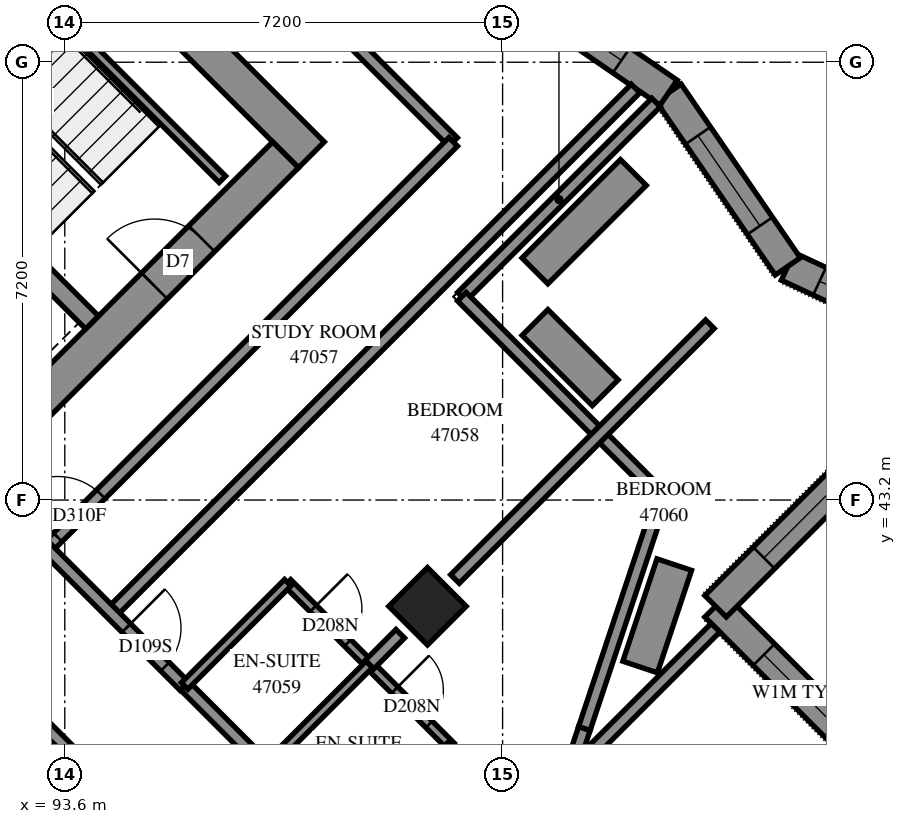
"""IFC4 building model, lengths in metres.
Left out: names, types, materials, properties, quantities, classifications, styles, units other than length and angle.
Written with IfcOpenShell. Run it as: python <this file> out.ifc"""

import sys

from ifc_helpers import new_model, si_unit, direction, frame, frame_2d, origin, origin_2d, place, context, subcontext, project, spatial, polyline, rectangle, outline, extrude, element, fill, save


model = new_model("IFC4")
c1 = context("Model", 3, precision=1e-05, world=origin(), true_north=direction((0.0, 1.0)))
c2 = subcontext(c1, "Body", "Model", "MODEL_VIEW")
j1 = project(units=[si_unit("LENGTHUNIT", "METRE"), si_unit("PLANEANGLEUNIT", "RADIAN")], contexts=[c1])
p1 = place(None, origin())
s1 = spatial("IfcSite", under=j1, at=p1, CompositionType="ELEMENT")
p2 = place(p1, origin())
s2 = spatial("IfcBuilding", under=s1, at=p2, CompositionType="ELEMENT")
p3 = place(p2, frame((0.0, 0.0, 172.8)))
s3 = spatial("IfcBuildingStorey", under=s2, at=p3, CompositionType="ELEMENT", Elevation=172.8)
p4 = place(p3, frame((99.565, 41.453, 0.0), z_axis=(0.0, 0.0, 1.0), x_axis=(0.7071067812, -0.7071067812, 0.0)))
e1 = element("IfcColumn", 1, at=p4, inside=s3, PredefinedType="COLUMN", context=c2, shape_type="SweptSolid", body=[
    extrude(rectangle(XDim=0.9, YDim=0.9, at=origin_2d()), origin(), (0.0, 0.0, 1.0), 3.1),
])
p5 = place(p3, frame((86.625, 59.908, -0.3), z_axis=(0.0, 0.0, 1.0), x_axis=(0.7071067812, -0.7071067812, 0.0)))
e2 = element("IfcWall", 2, at=p5, inside=s3, PredefinedType="SHEAR", context=c2, shape_type="SweptSolid", body=[
    extrude(rectangle(XDim=15.6, YDim=0.6, at=frame_2d((7.8, 0.0))), origin(), (0.0, 0.0, 1.0), 2.7),
])
p6 = place(p5, frame((10.6, 0.0, 0.3)))
e3 = element("IfcOpeningElement", 3, at=p6, cuts=e2, PredefinedType="OPENING", context=c2, shape_type="SweptSolid", body=[
    extrude(rectangle(XDim=0.8, YDim=2.1, at=frame_2d((0.4, 1.05))), frame((0.0, 0.31, 0.0), z_axis=(0.0, -1.0, 0.0), x_axis=(1.0, 0.0, 0.0)), (0.0, 0.0, 1.0), 0.62),
])
p7 = place(p3, frame((87.049, 38.695, -0.3), z_axis=(0.0, 0.0, 1.0), x_axis=(0.7071067812, 0.7071067812, 0.0)))
e4 = element("IfcWall", 4, at=p7, inside=s3, PredefinedType="SHEAR", context=c2, shape_type="SweptSolid", body=[
    extrude(rectangle(XDim=14.4, YDim=0.6, at=frame_2d((7.2, 0.0))), origin(), (0.0, 0.0, 1.0), 2.7),
])
p8 = place(p7, frame((4.55, 0.0, 0.3)))
e5 = element("IfcOpeningElement", 5, at=p8, cuts=e4, PredefinedType="OPENING", context=c2, shape_type="SweptSolid", body=[
    extrude(rectangle(XDim=1.1, YDim=2.1, at=frame_2d((0.55, 1.05))), frame((0.0, 0.31, 0.0), z_axis=(0.0, -1.0, 0.0), x_axis=(1.0, 0.0, 0.0)), (0.0, 0.0, 1.0), 0.62),
])
p9 = place(p7, frame((11.35, 0.0, 0.3)))
e6 = element("IfcOpeningElement", 6, at=p9, cuts=e4, PredefinedType="OPENING", context=c2, shape_type="SweptSolid", body=[
    extrude(rectangle(XDim=1.1, YDim=2.1, at=frame_2d((0.55, 1.05))), frame((0.0, 0.31, 0.0), z_axis=(0.0, -1.0, 0.0), x_axis=(1.0, 0.0, 0.0)), (0.0, 0.0, 1.0), 0.62),
])
p10 = place(p3, frame((88.958, 51.211, 0.0), z_axis=(0.0, 0.0, 1.0), x_axis=(0.7070998367, -0.7071137256, 0.0)))
e7 = element("IfcWall", 7, at=p10, inside=s3, PredefinedType="SOLIDWALL", context=c2, shape_type="SweptSolid", body=[
    extrude(rectangle(XDim=7.2, YDim=0.3, at=frame_2d((3.6, 0.0))), origin(), (0.0, 0.0, 1.0), 3.1),
])
p11 = place(p3, frame((107.761, 37.994, 0.0), z_axis=(0.0, 0.0, 1.0), x_axis=(-0.7071272252, 0.7070863366, 0.0)))
e8 = element("IfcWall", 8, at=p11, inside=s3, PredefinedType="SOLIDWALL", context=c2, shape_type="SweptSolid", body=[
    extrude(outline(polyline([(-0.159, -0.25), (4.641, -0.25), (5.141, 0.25), (0.159, 0.25), (-0.159, -0.25)])), origin(), (0.0, 0.0, 1.0), 3.1),
])
p12 = place(p11, frame((1.966, 0.0, 0.7)))
e9 = element("IfcOpeningElement", 9, at=p12, cuts=e8, PredefinedType="OPENING", context=c2, shape_type="SweptSolid", body=[
    extrude(rectangle(XDim=1.8, YDim=1.8, at=frame_2d((0.9, 0.9))), frame((0.0, 0.26, 0.0), z_axis=(0.0, -1.0, 0.0), x_axis=(1.0, 0.0, 0.0)), (0.0, 0.0, 1.0), 0.52),
])
p13 = place(p3, frame((104.302, 41.453, 0.0), z_axis=(0.0, 0.0, 1.0), x_axis=(0.7071152225, 0.7070983398, 0.0)))
e10 = element("IfcWall", 10, at=p13, inside=s3, PredefinedType="SOLIDWALL", context=c2, shape_type="SweptSolid", body=[
    extrude(outline(polyline([(0.25, -0.25), (6.28, -0.25), (5.566, 0.25), (-0.25, 0.25), (0.25, -0.25)])), origin(), (0.0, 0.0, 1.0), 3.1),
])
p14 = place(p13, frame((1.125, 0.0, 0.7)))
e11 = element("IfcOpeningElement", 11, at=p14, cuts=e10, PredefinedType="OPENING", context=c2, shape_type="SweptSolid", body=[
    extrude(rectangle(XDim=1.8, YDim=1.8, at=frame_2d((0.9, 0.9))), frame((0.0, 0.26, 0.0), z_axis=(0.0, -1.0, 0.0), x_axis=(1.0, 0.0, 0.0)), (0.0, 0.0, 1.0), 0.52),
])
p15 = place(p3, frame((108.491, 45.641, 0.0), z_axis=(0.0, 0.0, 1.0), x_axis=(-0.9061206526, 0.4230193411, 0.0)))
e12 = element("IfcWall", 12, at=p15, inside=s3, PredefinedType="SOLIDWALL", context=c2, shape_type="SweptSolid", body=[
    extrude(outline(polyline([(-0.357, -0.25), (3.244, -0.25), (3.38, 0.25), (0.357, 0.25), (-0.357, -0.25)])), origin(), (0.0, 0.0, 1.0), 3.1),
])
p16 = place(p15, frame((0.934, 0.0, 0.7)))
e13 = element("IfcOpeningElement", 13, at=p16, cuts=e12, PredefinedType="OPENING", context=c2, shape_type="SweptSolid", body=[
    extrude(rectangle(XDim=1.8, YDim=1.8, at=frame_2d((0.9, 0.9))), frame((0.0, 0.26, 0.0), z_axis=(0.0, -1.0, 0.0), x_axis=(1.0, 0.0, 0.0)), (0.0, 0.0, 1.0), 0.52),
])
p17 = place(p3, frame((105.489, 47.042, 0.0), z_axis=(0.0, 0.0, 1.0), x_axis=(-0.5657493712, 0.8245772547, 0.0)))
e14 = element("IfcWall", 14, at=p17, inside=s3, PredefinedType="SOLIDWALL", context=c2, shape_type="SweptSolid", body=[
    extrude(outline(polyline([(0.068, -0.25), (3.511, -0.25), (3.417, 0.25), (-0.068, 0.25), (0.068, -0.25)])), origin(), (0.0, 0.0, 1.0), 3.1),
])
p18 = place(p17, frame((0.809, 0.0, 0.7)))
e15 = element("IfcOpeningElement", 15, at=p18, cuts=e14, PredefinedType="OPENING", context=c2, shape_type="SweptSolid", body=[
    extrude(rectangle(XDim=1.8, YDim=1.8, at=frame_2d((0.9, 0.9))), frame((0.0, 0.26, 0.0), z_axis=(0.0, -1.0, 0.0), x_axis=(1.0, 0.0, 0.0)), (0.0, 0.0, 1.0), 0.52),
])
p19 = place(p3, frame((103.53, 49.899, 0.0), z_axis=(0.0, 0.0, 1.0), x_axis=(-0.8245704852, 0.5657592376, 0.0)))
e16 = element("IfcWall", 16, at=p19, inside=s3, PredefinedType="SOLIDWALL", context=c2, shape_type="SweptSolid", body=[
    extrude(outline(polyline([(-0.046, -0.25), (3.396, -0.25), (3.489, 0.25), (0.046, 0.25), (-0.046, -0.25)])), origin(), (0.0, 0.0, 1.0), 3.1),
])
p20 = place(p19, frame((0.941, 0.0, 0.7)))
e17 = element("IfcOpeningElement", 17, at=p20, cuts=e16, PredefinedType="OPENING", context=c2, shape_type="SweptSolid", body=[
    extrude(rectangle(XDim=1.8, YDim=2.1, at=frame_2d((0.9, 1.05))), frame((0.0, 0.26, 0.0), z_axis=(0.0, -1.0, 0.0), x_axis=(1.0, 0.0, 0.0)), (0.0, 0.0, 1.0), 0.52),
])
p21 = place(p3, frame((103.323, 49.737, 0.0), z_axis=(0.0, 0.0, 1.0), x_axis=(-0.707117854, -0.7070957082, 0.0)))
e18 = element("IfcWall", 18, at=p21, inside=s3, PredefinedType="PARAPET", context=c2, shape_type="SweptSolid", body=[
    extrude(outline(polyline([(0.0, -0.1), (4.615, -0.1), (4.415, 0.1), (0.0, 0.1), (0.0, -0.1)])), origin(), (0.0, 0.0, 1.0), 0.25),
])
p22 = place(p3, frame((100.13, 46.544, 0.0), z_axis=(0.0, 0.0, 1.0), x_axis=(0.7070852627, -0.707128299, 0.0)))
e19 = element("IfcWall", 19, at=p22, inside=s3, PredefinedType="PARAPET", context=c2, shape_type="SweptSolid", body=[
    extrude(outline(polyline([(-0.1, -0.1), (4.585, -0.1), (4.709, 0.1), (0.1, 0.1), (-0.1, -0.1)])), origin(), (0.0, 0.0, 1.0), 0.25),
])
p23 = place(p3, frame((103.416, 43.258, 0.0), z_axis=(0.0, 0.0, 1.0), x_axis=(-0.3160011426, -0.9487588091, 0.0)))
e20 = element("IfcWall", 20, at=p23, inside=s3, PredefinedType="PARAPET", context=c2, shape_type="SweptSolid", body=[
    extrude(outline(polyline([(0.062, -0.1), (0.397, -0.1), (0.397, 0.1), (-0.062, 0.1), (0.062, -0.1)])), origin(), (0.0, 0.0, 1.0), 0.25),
])
p24 = place(p3, frame((103.291, 42.881, 0.0), z_axis=(0.0, 0.0, 1.0), x_axis=(-0.3162443117, -0.9486777827, 0.0)))
e21 = element("IfcWall", 21, at=p24, inside=s3, PredefinedType="PARAPET", context=c2, shape_type="SweptSolid", body=[
    extrude(outline(polyline([(0.0, -0.1), (3.626, -0.1), (3.626, 0.1), (0.0, 0.1), (0.0, -0.1)])), origin(), (0.0, 0.0, 1.0), 0.25),
])
p25 = place(p3, frame((102.144, 39.441, 0.0), z_axis=(0.0, 0.0, 1.0), x_axis=(-0.3161671582, -0.9487034985, 0.0)))
e22 = element("IfcWall", 22, at=p25, inside=s3, PredefinedType="PARAPET", context=c2, shape_type="SweptSolid", body=[
    extrude(outline(polyline([(0.0, -0.1), (0.99, -0.1), (0.99, 0.1), (0.0, 0.1), (0.0, -0.1)])), origin(), (0.0, 0.0, 1.0), 0.25),
])
p26 = place(p3, frame((101.332, 46.12, 0.0), z_axis=(0.0, 0.0, 1.0), x_axis=(0.7070761738, -0.7071373872, 0.0)))
e23 = element("IfcWall", 23, at=p26, inside=s3, PredefinedType="SOLIDWALL", context=c2, shape_type="SweptSolid", body=[
    extrude(rectangle(XDim=1.634, YDim=0.6, at=frame_2d((0.817, 0.0))), origin(), (0.0, 0.0, 1.0), 0.65),
])
p27 = place(p3, frame((103.623, 42.138, 0.0), z_axis=(0.0, 0.0, 1.0), x_axis=(-0.3162446684, -0.9486776638, 0.0)))
e24 = element("IfcWall", 24, at=p27, inside=s3, PredefinedType="SOLIDWALL", context=c2, shape_type="SweptSolid", body=[
    extrude(rectangle(XDim=1.775, YDim=0.6, at=frame_2d((0.887, 0.0))), origin(), (0.0, 0.0, 1.0), 0.65),
])
p28 = place(p3, frame((91.313, 53.354, 0.0), z_axis=(0.0, 0.0, 1.0), x_axis=(0.7071140275, -0.7070995348, 0.0)))
e25 = element("IfcWall", 25, at=p28, inside=s3, PredefinedType="PARTITIONING", context=c2, shape_type="SweptSolid", body=[
    extrude(rectangle(XDim=6.9, YDim=0.15, at=frame_2d((3.45, 0.0))), origin(), (0.0, 0.0, 1.0), 3.1),
])
p29 = place(p3, frame((94.366, 41.348, 0.0), z_axis=(0.0, 0.0, 1.0), x_axis=(0.7071108825, 0.7071026798, 0.0)))
e26 = element("IfcWall", 26, at=p29, inside=s3, PredefinedType="PARTITIONING", context=c2, shape_type="SweptSolid", body=[
    extrude(rectangle(XDim=12.191, YDim=0.2, at=frame_2d((6.096, 0.0))), origin(), (0.0, 0.0, 1.0), 3.1),
])
p30 = place(p3, frame((91.967, 40.785, 0.0), z_axis=(0.0, 0.0, 1.0), x_axis=(0.7071067812, -0.7071067812, 0.0)))
e27 = element("IfcWall", 27, at=p30, inside=s3, PredefinedType="PARTITIONING", context=c2, shape_type="SweptSolid", body=[
    extrude(rectangle(XDim=12.1, YDim=0.2, at=frame_2d((6.05, 0.0))), origin(), (0.0, 0.0, 1.0), 3.1),
])
p31 = place(p30, frame((3.448, 0.0, 0.0)))
e28 = element("IfcOpeningElement", 28, at=p31, cuts=e27, PredefinedType="OPENING", context=c2, shape_type="SweptSolid", body=[
    extrude(rectangle(XDim=0.9, YDim=2.1, at=frame_2d((0.45, 1.05))), frame((0.0, 0.11, 0.0), z_axis=(0.0, -1.0, 0.0), x_axis=(1.0, 0.0, 0.0)), (0.0, 0.0, 1.0), 0.22),
])
p32 = place(p30, frame((8.457, 0.0, 0.0)))
e29 = element("IfcOpeningElement", 29, at=p32, cuts=e27, PredefinedType="OPENING", context=c2, shape_type="SweptSolid", body=[
    extrude(rectangle(XDim=1.0, YDim=2.1, at=frame_2d((0.5, 1.05))), frame((0.0, 0.11, 0.0), z_axis=(0.0, -1.0, 0.0), x_axis=(1.0, 0.0, 0.0)), (0.0, 0.0, 1.0), 0.22),
])
p33 = place(p3, frame((91.755, 57.317, 0.0), z_axis=(0.0, 0.0, 1.0), x_axis=(0.7071067812, -0.7071067812, 0.0)))
e30 = element("IfcWall", 30, at=p33, inside=s3, PredefinedType="PARTITIONING", context=c2, shape_type="SweptSolid", body=[
    extrude(rectangle(XDim=11.639, YDim=0.2, at=frame_2d((5.819, 0.0))), origin(), (0.0, 0.0, 1.0), 3.1),
])
p34 = place(p3, frame((93.306, 42.408, 0.0), z_axis=(0.0, 0.0, 1.0), x_axis=(0.7071067812, 0.7071067812, 0.0)))
e31 = element("IfcWall", 31, at=p34, inside=s3, PredefinedType="PARTITIONING", context=c2, shape_type="SweptSolid", body=[
    extrude(rectangle(XDim=9.45, YDim=0.2, at=frame_2d((4.725, 0.0))), origin(), (0.0, 0.0, 1.0), 3.1),
])
p35 = place(p34, frame((0.253, 0.0, 0.0)))
e32 = element("IfcOpeningElement", 32, at=p35, cuts=e31, PredefinedType="OPENING", context=c2, shape_type="SweptSolid", body=[
    extrude(rectangle(XDim=1.0, YDim=2.1, at=frame_2d((0.5, 1.05))), frame((0.0, 0.11, 0.0), z_axis=(0.0, -1.0, 0.0), x_axis=(1.0, 0.0, 0.0)), (0.0, 0.0, 1.0), 0.22),
])
p36 = place(p3, frame((99.458, 36.256, 0.0), z_axis=(0.0, 0.0, 1.0), x_axis=(0.7071067812, 0.7071067812, 0.0)))
e33 = element("IfcWall", 33, at=p36, inside=s3, PredefinedType="PARTITIONING", context=c2, shape_type="SweptSolid", body=[
    extrude(rectangle(XDim=6.85, YDim=0.2, at=frame_2d((3.425, 0.0))), origin(), (0.0, 0.0, 1.0), 3.1),
])
p37 = place(p3, frame((100.017, 41.901, 0.0), z_axis=(0.0, 0.0, 1.0), x_axis=(0.7072754814, 0.7069380408, 0.0)))
e34 = element("IfcWall", 34, at=p37, inside=s3, PredefinedType="PARTITIONING", context=c2, shape_type="SweptSolid", body=[
    extrude(rectangle(XDim=5.927, YDim=0.2, at=frame_2d((2.963, 0.0))), origin(), (0.0, 0.0, 1.0), 3.1),
])
p38 = place(p3, frame((97.263, 41.839, 0.0), z_axis=(0.0, 0.0, 1.0), x_axis=(0.7071067812, -0.7071067812, 0.0)))
e35 = element("IfcWall", 35, at=p38, inside=s3, PredefinedType="PARTITIONING", context=c2, shape_type="SweptSolid", body=[
    extrude(rectangle(XDim=3.801, YDim=0.15, at=frame_2d((1.901, 0.0))), origin(), (0.0, 0.0, 1.0), 3.1),
])
p39 = place(p38, frame((0.598, 0.0, 0.0)))
e36 = element("IfcOpeningElement", 36, at=p39, cuts=e35, PredefinedType="OPENING", context=c2, shape_type="SweptSolid", body=[
    extrude(rectangle(XDim=0.8, YDim=2.1, at=frame_2d((0.4, 1.05))), frame((0.0, 0.085, 0.0), z_axis=(0.0, -1.0, 0.0), x_axis=(1.0, 0.0, 0.0)), (0.0, 0.0, 1.0), 0.17),
])
p40 = place(p38, frame((2.493, 0.0, 0.0)))
e37 = element("IfcOpeningElement", 37, at=p40, cuts=e35, PredefinedType="OPENING", context=c2, shape_type="SweptSolid", body=[
    extrude(rectangle(XDim=0.8, YDim=2.1, at=frame_2d((0.4, 1.05))), frame((0.0, 0.085, 0.0), z_axis=(0.0, -1.0, 0.0), x_axis=(1.0, 0.0, 0.0)), (0.0, 0.0, 1.0), 0.17),
])
p41 = place(p3, frame((95.573, 40.148, 0.0), z_axis=(0.0, 0.0, 1.0), x_axis=(0.7068698107, -0.7073436723, 0.0)))
e38 = element("IfcWall", 38, at=p41, inside=s3, PredefinedType="PARTITIONING", context=c2, shape_type="SweptSolid", body=[
    extrude(rectangle(XDim=3.799, YDim=0.2, at=frame_2d((1.899, 0.0))), origin(), (0.0, 0.0, 1.0), 3.1),
])
p42 = place(p3, frame((93.305, 42.403, 0.0), z_axis=(0.0, 0.0, 1.0), x_axis=(0.7071067812, -0.7071067812, 0.0)))
e39 = element("IfcWall", 39, at=p42, inside=s3, PredefinedType="PARTITIONING", context=c2, shape_type="SweptSolid", body=[
    extrude(rectangle(XDim=3.199, YDim=0.2, at=frame_2d((1.599, 0.0))), origin(), (0.0, 0.0, 1.0), 3.1),
])
p43 = place(p42, frame((1.848, 0.0, 0.0)))
e40 = element("IfcOpeningElement", 40, at=p43, cuts=e39, PredefinedType="OPENING", context=c2, shape_type="SweptSolid", body=[
    extrude(rectangle(XDim=0.9, YDim=2.1, at=frame_2d((0.45, 1.05))), frame((0.0, 0.11, 0.0), z_axis=(0.0, -1.0, 0.0), x_axis=(1.0, 0.0, 0.0)), (0.0, 0.0, 1.0), 0.22),
])
for number, where, z_axis, x_axis in (
    (41, (95.571, 40.143, 0.0), (0.0, 0.0, 1.0), (0.707, 0.708, 0.0)),
    (42, (98.253, 37.461, 0.0), (0.0, 0.0, 1.0), (0.708, 0.707, 0.0)),
):
    element("IfcWall", number, at=place(p3, frame(where, z_axis=z_axis, x_axis=x_axis)), inside=s3, PredefinedType="PARTITIONING", context=c2, shape_type="SweptSolid", body=[
        extrude(rectangle(XDim=2.4, YDim=0.15, at=frame_2d((1.2, 0.0))), origin(), (0.0, 0.0, 1.0), 3.1),
    ])
p44 = place(p3, frame((96.913, 38.803, 0.0), z_axis=(0.0, 0.0, 1.0), x_axis=(0.7071067812, 0.7071067812, 0.0)))
e43 = element("IfcWall", 43, at=p44, inside=s3, PredefinedType="PARTITIONING", context=c2, shape_type="SweptSolid", body=[
    extrude(rectangle(XDim=2.398, YDim=0.15, at=frame_2d((1.199, 0.0))), origin(), (0.0, 0.0, 1.0), 2.6),
])
p45 = place(p3, frame((98.613, 40.495, 0.0), z_axis=(0.0, 0.0, 1.0), x_axis=(0.7057051861, 0.7085056035, 0.0)))
e44 = element("IfcWall", 44, at=p45, inside=s3, PredefinedType="PARTITIONING", context=c2, shape_type="SweptSolid", body=[
    extrude(rectangle(XDim=0.714, YDim=0.2, at=frame_2d((0.357, 0.0))), origin(), (0.0, 0.0, 1.0), 2.6),
])
p46 = place(p3, frame((102.951, 48.587, 0.0), z_axis=(0.0, 0.0, 1.0), x_axis=(-0.7071067812, -0.7071067812, 0.0)))
e45 = element("IfcWall", 45, at=p46, inside=s3, PredefinedType="SOLIDWALL", context=c2, shape_type="SweptSolid", body=[
    extrude(outline(polyline([(0.0, -0.3), (2.288, -0.3), (2.288, 0.3), (0.0, 0.3), (0.0, -0.3)])), origin(), (0.0, 0.0, 1.0), 0.65),
])
p47 = place(p12, origin())
e46 = element("IfcWindow", 46, at=p47, inside=s3, PartitioningType="SINGLE_PANEL", PredefinedType="WINDOW", context=c2, shape_type="SweptSolid", body=[
    extrude(rectangle(XDim=1.8, YDim=1.8, at=frame_2d((0.9, 0.9))), frame((0.0, 0.18, 0.0), z_axis=(0.0, -1.0, 0.0), x_axis=(1.0, 0.0, 0.0)), (0.0, 0.0, 1.0), 0.06),
])
fill(e9, e46)
p48 = place(p14, origin())
e47 = element("IfcWindow", 47, at=p48, inside=s3, PartitioningType="SINGLE_PANEL", PredefinedType="WINDOW", context=c2, shape_type="SweptSolid", body=[
    extrude(rectangle(XDim=1.8, YDim=1.8, at=frame_2d((0.9, 0.9))), frame((0.0, 0.18, 0.0), z_axis=(0.0, -1.0, 0.0), x_axis=(1.0, 0.0, 0.0)), (0.0, 0.0, 1.0), 0.06),
])
fill(e11, e47)
p49 = place(p16, origin())
e48 = element("IfcWindow", 48, at=p49, inside=s3, PartitioningType="SINGLE_PANEL", PredefinedType="WINDOW", context=c2, shape_type="SweptSolid", body=[
    extrude(rectangle(XDim=1.8, YDim=1.8, at=frame_2d((0.9, 0.9))), frame((0.0, 0.18, 0.0), z_axis=(0.0, -1.0, 0.0), x_axis=(1.0, 0.0, 0.0)), (0.0, 0.0, 1.0), 0.06),
])
fill(e13, e48)
p50 = place(p18, origin())
e49 = element("IfcWindow", 49, at=p50, inside=s3, PartitioningType="SINGLE_PANEL", PredefinedType="WINDOW", context=c2, shape_type="SweptSolid", body=[
    extrude(rectangle(XDim=1.8, YDim=1.8, at=frame_2d((0.9, 0.9))), frame((0.0, 0.18, 0.0), z_axis=(0.0, -1.0, 0.0), x_axis=(1.0, 0.0, 0.0)), (0.0, 0.0, 1.0), 0.06),
])
fill(e15, e49)
p51 = place(p20, origin())
e50 = element("IfcWindow", 50, at=p51, inside=s3, PartitioningType="SINGLE_PANEL", PredefinedType="WINDOW", context=c2, shape_type="SweptSolid", body=[
    extrude(rectangle(XDim=1.8, YDim=2.1, at=frame_2d((0.9, 1.05))), frame((0.0, 0.18, 0.0), z_axis=(0.0, -1.0, 0.0), x_axis=(1.0, 0.0, 0.0)), (0.0, 0.0, 1.0), 0.06),
])
fill(e17, e50)
p52 = place(p9, origin())
e51 = element("IfcDoor", 51, at=p52, inside=s3, OperationType="SINGLE_SWING_RIGHT", PredefinedType="DOOR", context=c2, shape_type="SweptSolid", body=[
    extrude(rectangle(XDim=1.1, YDim=2.1, at=frame_2d((0.55, 1.05))), frame((0.0, 0.025, 0.0), z_axis=(0.0, -1.0, 0.0), x_axis=(1.0, 0.0, 0.0)), (0.0, 0.0, 1.0), 0.05),
])
fill(e6, e51)
p53 = place(p35, origin())
e52 = element("IfcDoor", 52, at=p53, inside=s3, OperationType="SINGLE_SWING_RIGHT", PredefinedType="DOOR", context=c2, shape_type="SweptSolid", body=[
    extrude(rectangle(XDim=1.0, YDim=2.1, at=frame_2d((0.5, 1.05))), frame((0.0, 0.025, 0.0), z_axis=(0.0, -1.0, 0.0), x_axis=(1.0, 0.0, 0.0)), (0.0, 0.0, 1.0), 0.05),
])
fill(e32, e52)
p54 = place(p43, origin())
e53 = element("IfcDoor", 53, at=p54, inside=s3, OperationType="SINGLE_SWING_RIGHT", PredefinedType="DOOR", context=c2, shape_type="SweptSolid", body=[
    extrude(rectangle(XDim=0.9, YDim=2.1, at=frame_2d((0.45, 1.05))), frame((0.0, 0.025, 0.0), z_axis=(0.0, -1.0, 0.0), x_axis=(1.0, 0.0, 0.0)), (0.0, 0.0, 1.0), 0.05),
])
fill(e40, e53)
p55 = place(p39, origin())
e54 = element("IfcDoor", 54, at=p55, inside=s3, OperationType="SINGLE_SWING_RIGHT", PredefinedType="DOOR", context=c2, shape_type="SweptSolid", body=[
    extrude(rectangle(XDim=0.8, YDim=2.1, at=frame_2d((0.4, 1.05))), frame((0.0, 0.025, 0.0), z_axis=(0.0, -1.0, 0.0), x_axis=(1.0, 0.0, 0.0)), (0.0, 0.0, 1.0), 0.05),
])
fill(e36, e54)
p56 = place(p40, origin())
e55 = element("IfcDoor", 55, at=p56, inside=s3, OperationType="SINGLE_SWING_RIGHT", PredefinedType="DOOR", context=c2, shape_type="SweptSolid", body=[
    extrude(rectangle(XDim=0.8, YDim=2.1, at=frame_2d((0.4, 1.05))), frame((0.0, 0.025, 0.0), z_axis=(0.0, -1.0, 0.0), x_axis=(1.0, 0.0, 0.0)), (0.0, 0.0, 1.0), 0.05),
])
fill(e37, e55)
save(model, sys.argv[1])
